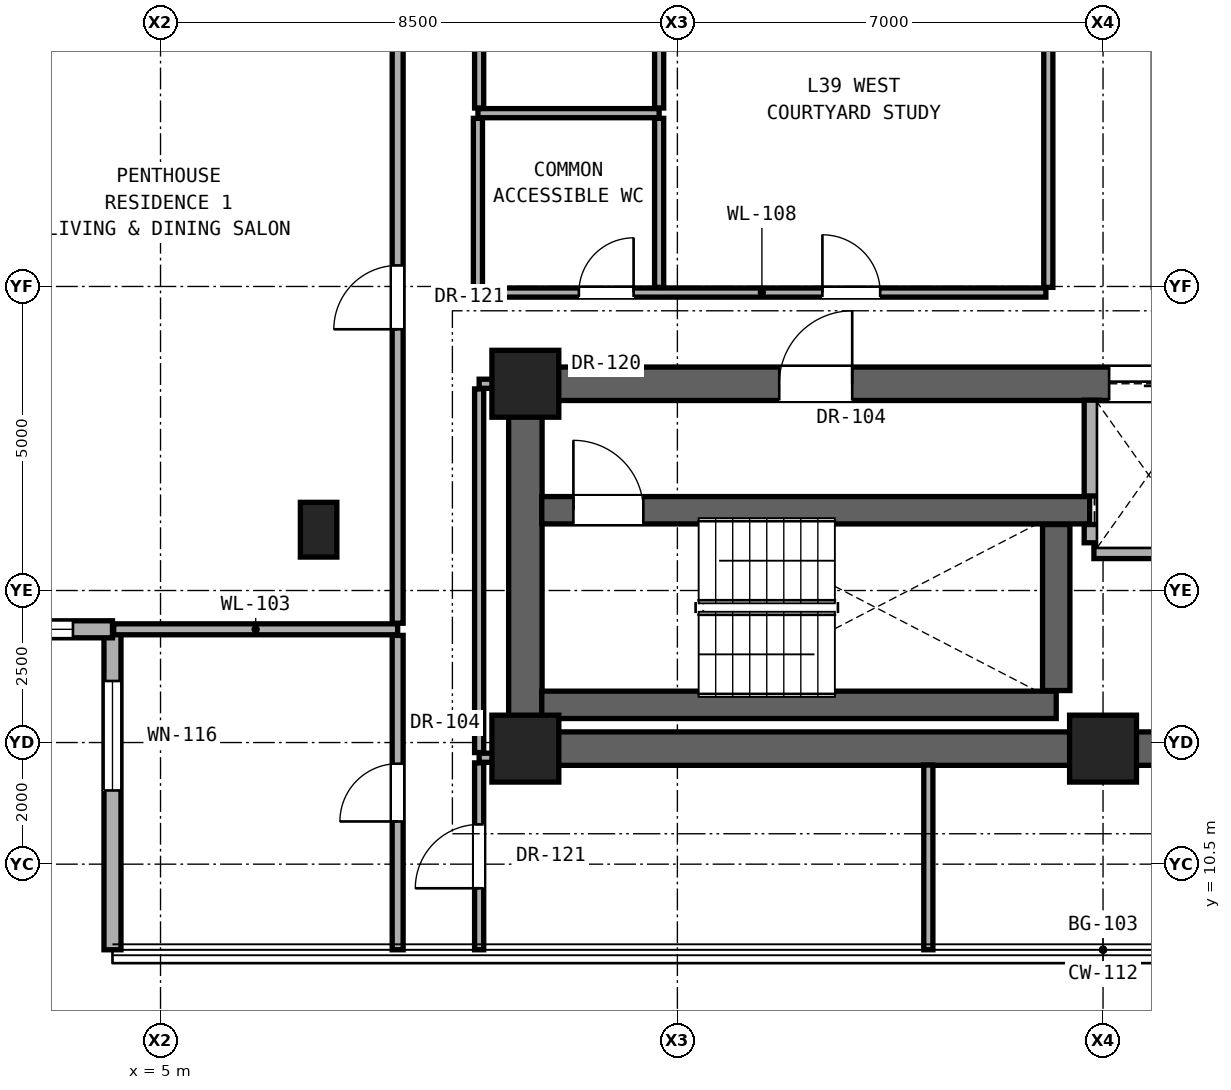
"""IFC4 building model, lengths in metres.
Left out: names, types, materials, properties, quantities, classifications, styles, units other than length and angle.
Written with IfcOpenShell. Run it as: python <this file> out.ifc"""

import sys

from ifc_helpers import new_model, si_unit, direction, frame, frame_2d, origin, origin_2d, place, context, subcontext, project, spatial, rectangle, extrude, element, fill, save


model = new_model("IFC4")
c1 = context("Model", 3, precision=1e-05, world=origin(), true_north=direction((0.0, 1.0)))
c2 = subcontext(c1, "Body", "Model", "MODEL_VIEW")
j1 = project(units=[si_unit("LENGTHUNIT", "METRE"), si_unit("PLANEANGLEUNIT", "RADIAN")], contexts=[c1])
p1 = place(None, origin())
s1 = spatial("IfcSite", under=j1, at=p1, CompositionType="ELEMENT")
p2 = place(p1, origin())
s2 = spatial("IfcBuilding", under=s1, at=p2, CompositionType="ELEMENT")
p3 = place(p2, frame((0.0, 0.0, 137.9)))
s3 = spatial("IfcBuildingStorey", under=s2, at=p3, CompositionType="ELEMENT", Elevation=137.9)
for number, where, z_axis, x_axis in (
    (1, (11.0, 12.4, 0.0), (0.0, 0.0, 1.0), (1.0, 0.0, 0.0)),
    (2, (20.5, 12.4, 0.0), (0.0, 0.0, 1.0), (1.0, 0.0, 0.0)),
    (3, (11.0, 18.4, 0.0), (0.0, 0.0, 1.0), (1.0, 0.0, 0.0)),
):
    element("IfcColumn", number, at=place(p3, frame(where, z_axis=z_axis, x_axis=x_axis)), inside=s3, PredefinedType="COLUMN", context=c2, shape_type="SweptSolid", body=[
        extrude(rectangle(XDim=1.1, YDim=1.1, at=origin_2d()), origin(), (0.0, 0.0, 1.0), 3.3),
    ])
p4 = place(p3, frame((7.6, 16.0, 0.0), z_axis=(0.0, 0.0, 1.0), x_axis=(1.0, 0.0, 0.0)))
e4 = element("IfcColumn", 4, at=p4, inside=s3, PredefinedType="PILASTER", context=c2, shape_type="SweptSolid", body=[
    extrude(rectangle(XDim=0.6, YDim=0.9, at=origin_2d()), origin(), (0.0, 0.0, 1.0), 3.3),
])
p5 = place(p3, frame((11.0, 12.4, 0.0), z_axis=(0.0, 0.0, 1.0), x_axis=(1.0, 0.0, 0.0)))
e5 = element("IfcWall", 5, at=p5, inside=s3, PredefinedType="SHEAR", context=c2, shape_type="SweptSolid", body=[
    extrude(rectangle(XDim=19.0, YDim=0.55, at=frame_2d((9.5, 0.0))), origin(), (0.0, 0.0, 1.0), 3.08),
])
p6 = place(p3, frame((11.0, 12.4, 0.0), z_axis=(0.0, 0.0, 1.0), x_axis=(0.0, 1.0, 0.0)))
e6 = element("IfcWall", 6, at=p6, inside=s3, PredefinedType="SHEAR", context=c2, shape_type="SweptSolid", body=[
    extrude(rectangle(XDim=6.0, YDim=0.55, at=frame_2d((3.0, 0.0))), origin(), (0.0, 0.0, 1.0), 3.08),
])
p7 = place(p3, frame((11.0, 18.4, 0.0), z_axis=(0.0, 0.0, 1.0), x_axis=(1.0, 0.0, 0.0)))
e7 = element("IfcWall", 7, at=p7, inside=s3, PredefinedType="SHEAR", context=c2, shape_type="SweptSolid", body=[
    extrude(rectangle(XDim=19.0, YDim=0.55, at=frame_2d((9.5, 0.0))), origin(), (0.0, 0.0, 1.0), 3.08),
])
p8 = place(p7, frame((4.175, 0.0, 0.0)))
e8 = element("IfcOpeningElement", 8, at=p8, cuts=e7, PredefinedType="OPENING", context=c2, shape_type="SweptSolid", body=[
    extrude(rectangle(XDim=1.2, YDim=2.25, at=frame_2d((0.6, 1.125))), frame((0.0, 0.285, 0.0), z_axis=(0.0, -1.0, 0.0), x_axis=(1.0, 0.0, 0.0)), (0.0, 0.0, 1.0), 0.57),
])
p9 = place(p7, frame((9.6, 0.0, 0.0)))
e9 = element("IfcOpeningElement", 9, at=p9, cuts=e7, PredefinedType="OPENING", context=c2, shape_type="SweptSolid", body=[
    extrude(rectangle(XDim=1.3, YDim=2.3, at=frame_2d((0.65, 1.15))), frame((0.0, 0.285, 0.0), z_axis=(0.0, -1.0, 0.0), x_axis=(1.0, 0.0, 0.0)), (0.0, 0.0, 1.0), 0.57),
])
p10 = place(p7, frame((11.9, 0.0, 0.0)))
e10 = element("IfcOpeningElement", 10, at=p10, cuts=e7, PredefinedType="OPENING", context=c2, shape_type="SweptSolid", body=[
    extrude(rectangle(XDim=1.3, YDim=2.3, at=frame_2d((0.65, 1.15))), frame((0.0, 0.285, 0.0), z_axis=(0.0, -1.0, 0.0), x_axis=(1.0, 0.0, 0.0)), (0.0, 0.0, 1.0), 0.57),
])
p11 = place(p7, frame((14.3, 0.0, 0.0)))
e11 = element("IfcOpeningElement", 11, at=p11, cuts=e7, PredefinedType="OPENING", context=c2, shape_type="SweptSolid", body=[
    extrude(rectangle(XDim=1.3, YDim=2.3, at=frame_2d((0.65, 1.15))), frame((0.0, 0.285, 0.0), z_axis=(0.0, -1.0, 0.0), x_axis=(1.0, 0.0, 0.0)), (0.0, 0.0, 1.0), 0.57),
])
p12 = place(p7, frame((16.6, 0.0, 0.0)))
e12 = element("IfcOpeningElement", 12, at=p12, cuts=e7, PredefinedType="OPENING", context=c2, shape_type="SweptSolid", body=[
    extrude(rectangle(XDim=1.3, YDim=2.3, at=frame_2d((0.65, 1.15))), frame((0.0, 0.285, 0.0), z_axis=(0.0, -1.0, 0.0), x_axis=(1.0, 0.0, 0.0)), (0.0, 0.0, 1.0), 0.57),
])
p13 = place(p3, frame((4.21, 14.362, 0.0), z_axis=(0.0, 0.0, 1.0), x_axis=(0.0, -1.0, 0.0)))
e13 = element("IfcWall", 13, at=p13, inside=s3, PredefinedType="SOLIDWALL", context=c2, shape_type="SweptSolid", body=[
    extrude(rectangle(XDim=5.27, YDim=0.28, at=frame_2d((2.635, 0.0))), origin(), (0.0, 0.0, 1.0), 3.06),
])
p14 = place(p13, frame((0.85, 0.0, 0.81)))
e14 = element("IfcOpeningElement", 14, at=p14, cuts=e13, PredefinedType="OPENING", context=c2, shape_type="SweptSolid", body=[
    extrude(rectangle(XDim=1.8, YDim=2.1, at=frame_2d((0.9, 1.05))), frame((0.0, 0.15, 0.0), z_axis=(0.0, -1.0, 0.0), x_axis=(1.0, 0.0, 0.0)), (0.0, 0.0, 1.0), 0.3),
])
p15 = place(p3, frame((-1.06, 14.362, 0.0), z_axis=(0.0, 0.0, 1.0), x_axis=(1.0, 0.0, 0.0)))
e15 = element("IfcWall", 15, at=p15, inside=s3, PredefinedType="SOLIDWALL", context=c2, shape_type="SweptSolid", body=[
    extrude(rectangle(XDim=5.27, YDim=0.28, at=frame_2d((2.635, 0.0))), origin(), (0.0, 0.0, 1.0), 3.06),
])
p16 = place(p15, frame((3.52, 0.0, 0.85)))
e16 = element("IfcOpeningElement", 16, at=p16, cuts=e15, PredefinedType="OPENING", context=c2, shape_type="SweptSolid", body=[
    extrude(rectangle(XDim=1.1, YDim=2.0, at=frame_2d((0.55, 1.0))), frame((0.0, 0.15, 0.0), z_axis=(0.0, -1.0, 0.0), x_axis=(1.0, 0.0, 0.0)), (0.0, 0.0, 1.0), 0.3),
])
p17 = place(p3, frame((10.24, 12.25, 0.0), z_axis=(0.0, 0.0, 1.0), x_axis=(1.0, 0.0, 0.0)))
e17 = element("IfcWall", 17, at=p17, inside=s3, PredefinedType="PARTITIONING", context=c2, shape_type="SweptSolid", body=[
    extrude(rectangle(XDim=0.49, YDim=0.15, at=frame_2d((0.245, 0.0))), origin(), (0.0, 0.0, 1.0), 3.08),
])
p18 = place(p3, frame((11.27, 13.12, 0.0), z_axis=(0.0, 0.0, 1.0), x_axis=(1.0, 0.0, 0.0)))
e18 = element("IfcWall", 18, at=p18, inside=s3, PredefinedType="SHEAR", context=c2, shape_type="SweptSolid", body=[
    extrude(rectangle(XDim=8.46, YDim=0.45, at=frame_2d((4.23, 0.0))), origin(), (0.0, 0.0, 1.0), 3.08),
])
p19 = place(p3, frame((4.23, 14.362, 0.0), z_axis=(0.0, 0.0, 1.0), x_axis=(1.0, 0.0, 0.0)))
e19 = element("IfcWall", 19, at=p19, inside=s3, PredefinedType="PARTITIONING", context=c2, shape_type="SweptSolid", body=[
    extrude(rectangle(XDim=4.67, YDim=0.18, at=frame_2d((2.335, 0.0))), origin(), (0.0, 0.0, 1.0), 3.08),
])
p20 = place(p3, frame((20.35, 15.65, 0.0), z_axis=(0.0, 0.0, 1.0), x_axis=(1.0, 0.0, 0.0)))
e20 = element("IfcWall", 20, at=p20, inside=s3, PredefinedType="SOLIDWALL", context=c2, shape_type="SweptSolid", body=[
    extrude(rectangle(XDim=4.15, YDim=0.25, at=frame_2d((2.075, 0.0))), origin(), (0.0, 0.0, 1.0), 3.08),
])
p21 = place(p3, frame((11.27, 16.32, 0.0), z_axis=(0.0, 0.0, 1.0), x_axis=(1.0, 0.0, 0.0)))
e21 = element("IfcWall", 21, at=p21, inside=s3, PredefinedType="SHEAR", context=c2, shape_type="SweptSolid", body=[
    extrude(rectangle(XDim=9.01, YDim=0.45, at=frame_2d((4.505, 0.0))), origin(), (0.0, 0.0, 1.0), 3.08),
])
p22 = place(p21, frame((0.52, 0.0, 0.0)))
e22 = element("IfcOpeningElement", 22, at=p22, cuts=e21, PredefinedType="OPENING", context=c2, shape_type="SweptSolid", body=[
    extrude(rectangle(XDim=1.15, YDim=2.2, at=frame_2d((0.575, 1.1))), frame((0.0, 0.235, 0.0), z_axis=(0.0, -1.0, 0.0), x_axis=(1.0, 0.0, 0.0)), (0.0, 0.0, 1.0), 0.47),
])
p23 = place(p3, frame((10.24, 18.4, 0.0), z_axis=(0.0, 0.0, 1.0), x_axis=(1.0, 0.0, 0.0)))
e23 = element("IfcWall", 23, at=p23, inside=s3, PredefinedType="PARTITIONING", context=c2, shape_type="SweptSolid", body=[
    extrude(rectangle(XDim=0.49, YDim=0.15, at=frame_2d((0.245, 0.0))), origin(), (0.0, 0.0, 1.0), 2.456),
])
p24 = place(p3, frame((10.22, 19.9, 0.0), z_axis=(0.0, 0.0, 1.0), x_axis=(1.0, 0.0, 0.0)))
e24 = element("IfcWall", 24, at=p24, inside=s3, PredefinedType="PARTITIONING", context=c2, shape_type="SweptSolid", body=[
    extrude(rectangle(XDim=9.34, YDim=0.15, at=frame_2d((4.67, 0.0))), origin(), (0.0, 0.0, 1.0), 2.216),
])
p25 = place(p24, frame((1.66, 0.0, 0.0)))
e25 = element("IfcOpeningElement", 25, at=p25, cuts=e24, PredefinedType="OPENING", context=c2, shape_type="SweptSolid", body=[
    extrude(rectangle(XDim=0.9, YDim=2.1, at=frame_2d((0.45, 1.05))), frame((0.0, 0.085, 0.0), z_axis=(0.0, -1.0, 0.0), x_axis=(1.0, 0.0, 0.0)), (0.0, 0.0, 1.0), 0.17),
])
p26 = place(p24, frame((5.665, 0.0, 0.0)))
e26 = element("IfcOpeningElement", 26, at=p26, cuts=e24, PredefinedType="OPENING", context=c2, shape_type="SweptSolid", body=[
    extrude(rectangle(XDim=0.95, YDim=2.15, at=frame_2d((0.475, 1.075))), frame((0.0, 0.085, 0.0), z_axis=(0.0, -1.0, 0.0), x_axis=(1.0, 0.0, 0.0)), (0.0, 0.0, 1.0), 0.17),
])
p27 = place(p3, frame((10.22, 22.85, 0.0), z_axis=(0.0, 0.0, 1.0), x_axis=(1.0, 0.0, 0.0)))
e27 = element("IfcWall", 27, at=p27, inside=s3, PredefinedType="PARTITIONING", context=c2, shape_type="SweptSolid", body=[
    extrude(rectangle(XDim=2.98, YDim=0.15, at=frame_2d((1.49, 0.0))), origin(), (0.0, 0.0, 1.0), 2.216),
])
p28 = place(p3, frame((8.9, 9.092, 0.0), z_axis=(0.0, 0.0, 1.0), x_axis=(0.0, 1.0, 0.0)))
e28 = element("IfcWall", 28, at=p28, inside=s3, PredefinedType="PARTITIONING", context=c2, shape_type="SweptSolid", body=[
    extrude(rectangle(XDim=5.17, YDim=0.18, at=frame_2d((2.585, 0.0))), origin(), (0.0, 0.0, 1.0), 3.08),
])
p29 = place(p28, frame((2.11, 0.0, 0.0)))
e29 = element("IfcOpeningElement", 29, at=p29, cuts=e28, PredefinedType="OPENING", context=c2, shape_type="SweptSolid", body=[
    extrude(rectangle(XDim=0.95, YDim=2.15, at=frame_2d((0.475, 1.075))), frame((0.0, 0.1, 0.0), z_axis=(0.0, -1.0, 0.0), x_axis=(1.0, 0.0, 0.0)), (0.0, 0.0, 1.0), 0.2),
])
p30 = place(p3, frame((8.9, 14.462, 0.0), z_axis=(0.0, 0.0, 1.0), x_axis=(0.0, 1.0, 0.0)))
e30 = element("IfcWall", 30, at=p30, inside=s3, PredefinedType="PARTITIONING", context=c2, shape_type="SweptSolid", body=[
    extrude(rectangle(XDim=10.718, YDim=0.18, at=frame_2d((5.359, 0.0))), origin(), (0.0, 0.0, 1.0), 2.299),
])
p31 = place(p30, frame((4.834, 0.0, 0.0)))
e31 = element("IfcOpeningElement", 31, at=p31, cuts=e30, PredefinedType="OPENING", context=c2, shape_type="SweptSolid", body=[
    extrude(rectangle(XDim=1.05, YDim=2.2, at=frame_2d((0.525, 1.1))), frame((0.0, 0.1, 0.0), z_axis=(0.0, -1.0, 0.0), x_axis=(1.0, 0.0, 0.0)), (0.0, 0.0, 1.0), 0.2),
])
p32 = place(p3, frame((10.22, 19.985, 0.0), z_axis=(0.0, 0.0, 1.0), x_axis=(0.0, 1.0, 0.0)))
e32 = element("IfcWall", 32, at=p32, inside=s3, PredefinedType="PARTITIONING", context=c2, shape_type="SweptSolid", body=[
    extrude(rectangle(XDim=2.78, YDim=0.15, at=frame_2d((1.39, 0.0))), origin(), (0.0, 0.0, 1.0), 3.08),
])
p33 = place(p3, frame((10.24, 9.092, 0.0), z_axis=(0.0, 0.0, 1.0), x_axis=(0.0, 1.0, 0.0)))
e33 = element("IfcWall", 33, at=p33, inside=s3, PredefinedType="PARTITIONING", context=c2, shape_type="SweptSolid", body=[
    extrude(rectangle(XDim=3.073, YDim=0.15, at=frame_2d((1.537, 0.0))), origin(), (0.0, 0.0, 1.0), 3.08),
])
p34 = place(p33, frame((1.011, 0.0, 0.0)))
e34 = element("IfcOpeningElement", 34, at=p34, cuts=e33, PredefinedType="OPENING", context=c2, shape_type="SweptSolid", body=[
    extrude(rectangle(XDim=1.05, YDim=2.2, at=frame_2d((0.525, 1.1))), frame((0.0, 0.085, 0.0), z_axis=(0.0, -1.0, 0.0), x_axis=(1.0, 0.0, 0.0)), (0.0, 0.0, 1.0), 0.17),
])
p35 = place(p3, frame((10.24, 12.335, 0.0), z_axis=(0.0, 0.0, 1.0), x_axis=(0.0, 1.0, 0.0)))
e35 = element("IfcWall", 35, at=p35, inside=s3, PredefinedType="PARTITIONING", context=c2, shape_type="SweptSolid", body=[
    extrude(rectangle(XDim=5.98, YDim=0.15, at=frame_2d((2.99, 0.0))), origin(), (0.0, 0.0, 1.0), 2.456),
])
p36 = place(p3, frame((10.24, 22.935, 0.0), z_axis=(0.0, 0.0, 1.0), x_axis=(0.0, 1.0, 0.0)))
e36 = element("IfcWall", 36, at=p36, inside=s3, PredefinedType="PARTITIONING", context=c2, shape_type="SweptSolid", body=[
    extrude(rectangle(XDim=2.58, YDim=0.15, at=frame_2d((1.29, 0.0))), origin(), (0.0, 0.0, 1.0), 2.299),
])
p37 = place(p3, frame((13.2, 19.985, 0.0), z_axis=(0.0, 0.0, 1.0), x_axis=(0.0, 1.0, 0.0)))
e37 = element("IfcWall", 37, at=p37, inside=s3, PredefinedType="PARTITIONING", context=c2, shape_type="SweptSolid", body=[
    extrude(rectangle(XDim=2.78, YDim=0.15, at=frame_2d((1.39, 0.0))), origin(), (0.0, 0.0, 1.0), 3.08),
])
p38 = place(p3, frame((13.2, 22.935, 0.0), z_axis=(0.0, 0.0, 1.0), x_axis=(0.0, 1.0, 0.0)))
e38 = element("IfcWall", 38, at=p38, inside=s3, PredefinedType="PARTITIONING", context=c2, shape_type="SweptSolid", body=[
    extrude(rectangle(XDim=2.58, YDim=0.15, at=frame_2d((1.29, 0.0))), origin(), (0.0, 0.0, 1.0), 2.216),
])
p39 = place(p3, frame((17.627, 9.092, 0.0), z_axis=(0.0, 0.0, 1.0), x_axis=(0.0, 1.0, 0.0)))
e39 = element("IfcWall", 39, at=p39, inside=s3, PredefinedType="PARTITIONING", context=c2, shape_type="SweptSolid", body=[
    extrude(rectangle(XDim=3.038, YDim=0.15, at=frame_2d((1.519, 0.0))), origin(), (0.0, 0.0, 1.0), 3.08),
])
p40 = place(p3, frame((19.6, 19.985, 0.0), z_axis=(0.0, 0.0, 1.0), x_axis=(0.0, 1.0, 0.0)))
e40 = element("IfcWall", 40, at=p40, inside=s3, PredefinedType="PARTITIONING", context=c2, shape_type="SweptSolid", body=[
    extrude(rectangle(XDim=5.53, YDim=0.15, at=frame_2d((2.765, 0.0))), origin(), (0.0, 0.0, 1.0), 2.216),
])
p41 = place(p3, frame((19.73, 13.355, 0.0), z_axis=(0.0, 0.0, 1.0), x_axis=(0.0, 1.0, 0.0)))
e41 = element("IfcWall", 41, at=p41, inside=s3, PredefinedType="SHEAR", context=c2, shape_type="SweptSolid", body=[
    extrude(rectangle(XDim=2.73, YDim=0.45, at=frame_2d((1.365, 0.0))), origin(), (0.0, 0.0, 1.0), 3.08),
])
p42 = place(p3, frame((20.315, 15.785, 0.0), z_axis=(0.0, 0.0, 1.0), x_axis=(0.0, 1.0, 0.0)))
e42 = element("IfcWall", 42, at=p42, inside=s3, PredefinedType="SOLIDWALL", context=c2, shape_type="SweptSolid", body=[
    extrude(rectangle(XDim=0.3, YDim=0.25, at=frame_2d((0.15, 0.0))), origin(), (0.0, 0.0, 1.0), 3.08),
])
p43 = place(p3, frame((20.315, 16.555, 0.0), z_axis=(0.0, 0.0, 1.0), x_axis=(0.0, 1.0, 0.0)))
e43 = element("IfcWall", 43, at=p43, inside=s3, PredefinedType="SOLIDWALL", context=c2, shape_type="SweptSolid", body=[
    extrude(rectangle(XDim=1.575, YDim=0.25, at=frame_2d((0.788, 0.0))), origin(), (0.0, 0.0, 1.0), 3.08),
])
p44 = place(p14, origin())
e44 = element("IfcWindow", 44, at=p44, inside=s3, PartitioningType="SINGLE_PANEL", PredefinedType="WINDOW", context=c2, shape_type="SweptSolid", body=[
    extrude(rectangle(XDim=1.8, YDim=2.1, at=frame_2d((0.9, 1.05))), frame((0.0, 0.03, 0.0), z_axis=(0.0, -1.0, 0.0), x_axis=(1.0, 0.0, 0.0)), (0.0, 0.0, 1.0), 0.06),
])
fill(e14, e44)
p45 = place(p16, origin())
e45 = element("IfcWindow", 45, at=p45, inside=s3, PartitioningType="SINGLE_PANEL", PredefinedType="WINDOW", context=c2, shape_type="SweptSolid", body=[
    extrude(rectangle(XDim=1.1, YDim=2.0, at=frame_2d((0.55, 1.0))), frame((0.0, 0.03, 0.0), z_axis=(0.0, -1.0, 0.0), x_axis=(1.0, 0.0, 0.0)), (0.0, 0.0, 1.0), 0.06),
])
fill(e16, e45)
p46 = place(p8, origin())
e46 = element("IfcDoor", 46, at=p46, inside=s3, OperationType="SINGLE_SWING_RIGHT", PredefinedType="DOOR", context=c2, shape_type="SweptSolid", body=[
    extrude(rectangle(XDim=1.2, YDim=2.25, at=frame_2d((0.6, 1.125))), frame((0.0, 0.025, 0.0), z_axis=(0.0, -1.0, 0.0), x_axis=(1.0, 0.0, 0.0)), (0.0, 0.0, 1.0), 0.05),
])
fill(e8, e46)
p47 = place(p22, origin())
e47 = element("IfcDoor", 47, at=p47, inside=s3, OperationType="SINGLE_SWING_LEFT", PredefinedType="DOOR", context=c2, shape_type="SweptSolid", body=[
    extrude(rectangle(XDim=1.15, YDim=2.2, at=frame_2d((0.575, 1.1))), frame((0.0, 0.025, 0.0), z_axis=(0.0, -1.0, 0.0), x_axis=(1.0, 0.0, 0.0)), (0.0, 0.0, 1.0), 0.05),
])
fill(e22, e47)
p48 = place(p25, origin())
e48 = element("IfcDoor", 48, at=p48, inside=s3, OperationType="SINGLE_SWING_RIGHT", PredefinedType="DOOR", context=c2, shape_type="SweptSolid", body=[
    extrude(rectangle(XDim=0.9, YDim=2.1, at=frame_2d((0.45, 1.05))), frame((0.0, 0.025, 0.0), z_axis=(0.0, -1.0, 0.0), x_axis=(1.0, 0.0, 0.0)), (0.0, 0.0, 1.0), 0.05),
])
fill(e25, e48)
p49 = place(p31, origin())
e49 = element("IfcDoor", 49, at=p49, inside=s3, OperationType="SINGLE_SWING_LEFT", PredefinedType="DOOR", context=c2, shape_type="SweptSolid", body=[
    extrude(rectangle(XDim=1.05, YDim=2.2, at=frame_2d((0.525, 1.1))), frame((0.0, 0.025, 0.0), z_axis=(0.0, -1.0, 0.0), x_axis=(1.0, 0.0, 0.0)), (0.0, 0.0, 1.0), 0.05),
])
fill(e31, e49)
p50 = place(p26, origin())
e50 = element("IfcDoor", 50, at=p50, inside=s3, OperationType="SINGLE_SWING_LEFT", PredefinedType="DOOR", context=c2, shape_type="SweptSolid", body=[
    extrude(rectangle(XDim=0.95, YDim=2.15, at=frame_2d((0.475, 1.075))), frame((0.0, 0.025, 0.0), z_axis=(0.0, -1.0, 0.0), x_axis=(1.0, 0.0, 0.0)), (0.0, 0.0, 1.0), 0.05),
])
fill(e26, e50)
p51 = place(p34, origin())
e51 = element("IfcDoor", 51, at=p51, inside=s3, OperationType="SINGLE_SWING_LEFT", PredefinedType="DOOR", context=c2, shape_type="SweptSolid", body=[
    extrude(rectangle(XDim=1.05, YDim=2.2, at=frame_2d((0.525, 1.1))), frame((0.0, 0.025, 0.0), z_axis=(0.0, -1.0, 0.0), x_axis=(1.0, 0.0, 0.0)), (0.0, 0.0, 1.0), 0.05),
])
fill(e34, e51)
p52 = place(p29, origin())
e52 = element("IfcDoor", 52, at=p52, inside=s3, OperationType="SINGLE_SWING_LEFT", PredefinedType="DOOR", context=c2, shape_type="SweptSolid", body=[
    extrude(rectangle(XDim=0.95, YDim=2.15, at=frame_2d((0.475, 1.075))), frame((0.0, 0.025, 0.0), z_axis=(0.0, -1.0, 0.0), x_axis=(1.0, 0.0, 0.0)), (0.0, 0.0, 1.0), 0.05),
])
fill(e29, e52)
p53 = place(p9, origin())
e53 = element("IfcDoor", 53, at=p53, inside=s3, OperationType="DOUBLE_DOOR_SLIDING", PredefinedType="DOOR", context=c2, shape_type="SweptSolid", body=[
    extrude(rectangle(XDim=1.3, YDim=2.3, at=frame_2d((0.65, 1.15))), frame((0.0, 0.025, 0.0), z_axis=(0.0, -1.0, 0.0), x_axis=(1.0, 0.0, 0.0)), (0.0, 0.0, 1.0), 0.05),
])
fill(e9, e53)
save(model, sys.argv[1])
